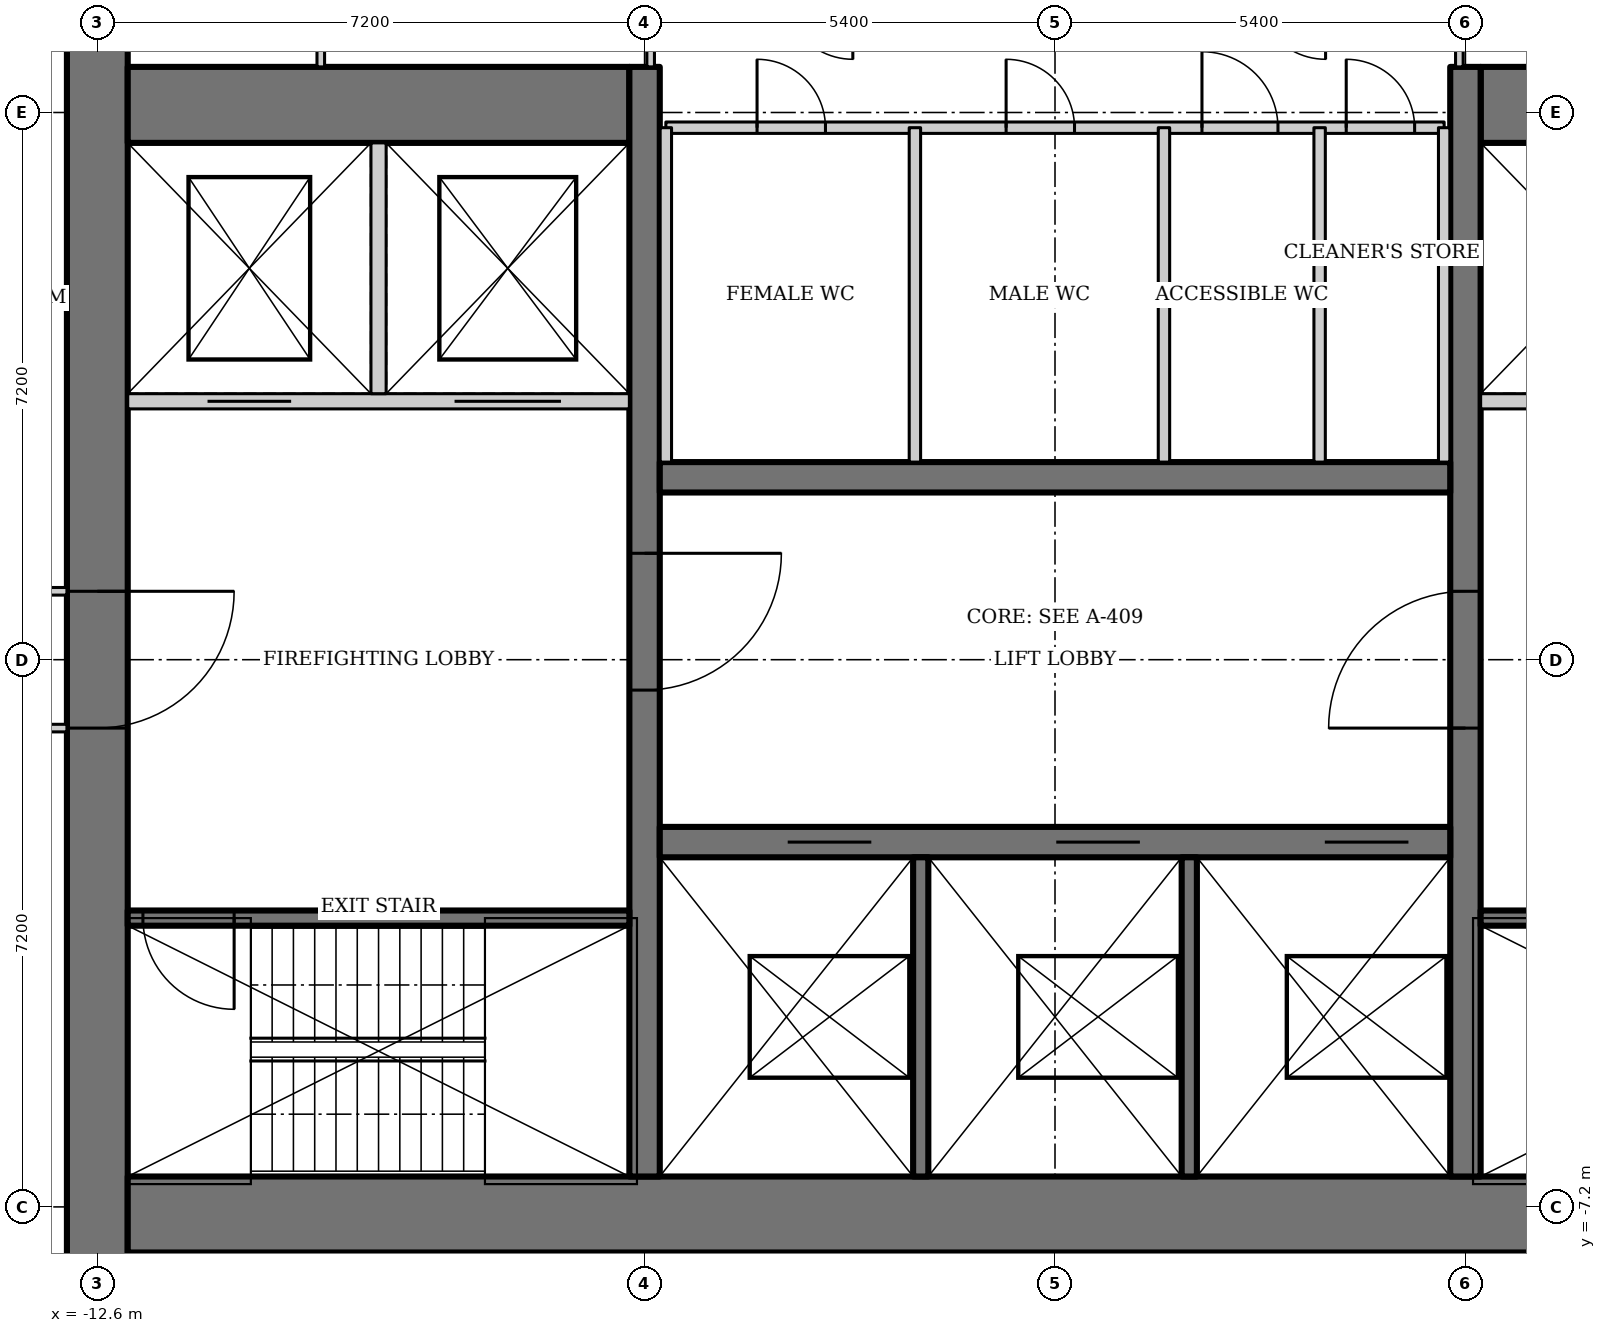
"""IFC4 building model, lengths in metres.
Left out: names, types, materials, properties, quantities, classifications, styles, units other than length and angle.
Written with IfcOpenShell. Run it as: python <this file> out.ifc"""

import sys

from ifc_helpers import new_model, si_unit, direction, frame, frame_2d, origin, place, context, subcontext, project, spatial, rectangle, extrude, element, fill, save


model = new_model("IFC4")
c1 = context("Model", 3, precision=1e-05, world=origin(), true_north=direction((0.0, 1.0)))
c2 = subcontext(c1, "Body", "Model", "MODEL_VIEW")
j1 = project(units=[si_unit("LENGTHUNIT", "METRE"), si_unit("PLANEANGLEUNIT", "RADIAN")], contexts=[c1])
p1 = place(None, origin())
s1 = spatial("IfcSite", under=j1, at=p1, CompositionType="ELEMENT")
p2 = place(p1, origin())
s2 = spatial("IfcBuilding", under=s1, at=p2, CompositionType="ELEMENT")
p3 = place(p2, frame((0.0, 0.0, 236.8)))
s3 = spatial("IfcBuildingStorey", under=s2, at=p3, CompositionType="ELEMENT", Elevation=236.8)
p4 = place(p3, frame((-12.6, 13.0, 0.0), z_axis=(0.0, 0.0, 1.0), x_axis=(0.0, -1.0, 0.0)))
e1 = element("IfcWall", 1, at=p4, inside=s3, PredefinedType="SHEAR", context=c2, shape_type="SweptSolid", body=[
    extrude(rectangle(XDim=26.0, YDim=0.8, at=frame_2d((13.0, 0.0))), origin(), (0.0, 0.0, 1.0), 4.2),
])
p5 = place(p4, frame((12.1, 0.0, 0.0)))
e2 = element("IfcOpeningElement", 2, at=p5, cuts=e1, PredefinedType="OPENING", context=c2, shape_type="SweptSolid", body=[
    extrude(rectangle(XDim=1.8, YDim=2.1, at=frame_2d((0.9, 1.05))), frame((0.0, 0.41, 0.0), z_axis=(0.0, -1.0, 0.0), x_axis=(1.0, 0.0, 0.0)), (0.0, 0.0, 1.0), 0.82),
])
p6 = place(p3, frame((-12.2, -7.3, 0.0), z_axis=(0.0, 0.0, 1.0), x_axis=(1.0, 0.0, 0.0)))
e3 = element("IfcWall", 3, at=p6, inside=s3, PredefinedType="SHEAR", context=c2, shape_type="SweptSolid", body=[
    extrude(rectangle(XDim=24.4, YDim=1.0, at=frame_2d((12.2, 0.0))), origin(), (0.0, 0.0, 1.0), 4.2),
])
for number, where, z_axis, x_axis in (
    (4, (12.2, 7.3, 0.0), (0.0, 0.0, 1.0), (-1.0, 0.0, 0.0)),
    (5, (-5.6, 7.3, 0.0), (0.0, 0.0, 1.0), (-1.0, 0.0, 0.0)),
):
    element("IfcWall", number, at=place(p3, frame(where, z_axis=z_axis, x_axis=x_axis)), inside=s3, PredefinedType="SHEAR", context=c2, shape_type="SweptSolid", body=[
        extrude(rectangle(XDim=6.6, YDim=1.0, at=frame_2d((3.3, 0.0))), origin(), (0.0, 0.0, 1.0), 4.2),
    ])
p7 = place(p3, frame((5.4, -6.8, 0.0), z_axis=(0.0, 0.0, 1.0), x_axis=(0.0, 1.0, 0.0)))
e6 = element("IfcWall", 6, at=p7, inside=s3, PredefinedType="SHEAR", context=c2, shape_type="SweptSolid", body=[
    extrude(rectangle(XDim=14.6, YDim=0.4, at=frame_2d((7.3, 0.0))), origin(), (0.0, 0.0, 1.0), 4.2),
])
p8 = place(p7, frame((5.9, 0.0, 0.0)))
e7 = element("IfcOpeningElement", 7, at=p8, cuts=e6, PredefinedType="OPENING", context=c2, shape_type="SweptSolid", body=[
    extrude(rectangle(XDim=1.8, YDim=2.1, at=frame_2d((0.9, 1.05))), frame((0.0, 0.21, 0.0), z_axis=(0.0, -1.0, 0.0), x_axis=(1.0, 0.0, 0.0)), (0.0, 0.0, 1.0), 0.42),
])
p9 = place(p3, frame((-5.4, 7.8, 0.0), z_axis=(0.0, 0.0, 1.0), x_axis=(0.0, -1.0, 0.0)))
e8 = element("IfcWall", 8, at=p9, inside=s3, PredefinedType="SHEAR", context=c2, shape_type="SweptSolid", body=[
    extrude(rectangle(XDim=14.6, YDim=0.4, at=frame_2d((7.3, 0.0))), origin(), (0.0, 0.0, 1.0), 4.2),
])
p10 = place(p9, frame((6.4, 0.0, 0.0)))
e9 = element("IfcOpeningElement", 9, at=p10, cuts=e8, PredefinedType="OPENING", context=c2, shape_type="SweptSolid", body=[
    extrude(rectangle(XDim=1.8, YDim=2.1, at=frame_2d((0.9, 1.05))), frame((0.0, 0.21, 0.0), z_axis=(0.0, -1.0, 0.0), x_axis=(1.0, 0.0, 0.0)), (0.0, 0.0, 1.0), 0.42),
])
p11 = place(p3, frame((-5.2, -2.4, 0.0), z_axis=(0.0, 0.0, 1.0), x_axis=(1.0, 0.0, 0.0)))
e10 = element("IfcWall", 10, at=p11, inside=s3, PredefinedType="SHEAR", context=c2, shape_type="SweptSolid", body=[
    extrude(rectangle(XDim=10.4, YDim=0.4, at=frame_2d((5.2, 0.0))), origin(), (0.0, 0.0, 1.0), 4.2),
])
p12 = place(p11, frame((1.683, 0.0, 0.0)))
e11 = element("IfcOpeningElement", 11, at=p12, cuts=e10, PredefinedType="OPENING", context=c2, shape_type="SweptSolid", body=[
    extrude(rectangle(XDim=1.1, YDim=2.2, at=frame_2d((0.55, 1.1))), frame((0.0, 0.21, 0.0), z_axis=(0.0, -1.0, 0.0), x_axis=(1.0, 0.0, 0.0)), (0.0, 0.0, 1.0), 0.42),
])
p13 = place(p11, frame((5.217, 0.0, 0.0)))
e12 = element("IfcOpeningElement", 12, at=p13, cuts=e10, PredefinedType="OPENING", context=c2, shape_type="SweptSolid", body=[
    extrude(rectangle(XDim=1.1, YDim=2.2, at=frame_2d((0.55, 1.1))), frame((0.0, 0.21, 0.0), z_axis=(0.0, -1.0, 0.0), x_axis=(1.0, 0.0, 0.0)), (0.0, 0.0, 1.0), 0.42),
])
p14 = place(p11, frame((8.75, 0.0, 0.0)))
e13 = element("IfcOpeningElement", 13, at=p14, cuts=e10, PredefinedType="OPENING", context=c2, shape_type="SweptSolid", body=[
    extrude(rectangle(XDim=1.1, YDim=2.2, at=frame_2d((0.55, 1.1))), frame((0.0, 0.21, 0.0), z_axis=(0.0, -1.0, 0.0), x_axis=(1.0, 0.0, 0.0)), (0.0, 0.0, 1.0), 0.42),
])
for number, where, z_axis, x_axis in (
    (14, (-1.767, -2.6, 0.0), (0.0, 0.0, 1.0), (0.0, -1.0, 0.0)),
    (15, (1.767, -2.6, 0.0), (0.0, 0.0, 1.0), (0.0, -1.0, 0.0)),
):
    element("IfcWall", number, at=place(p3, frame(where, z_axis=z_axis, x_axis=x_axis)), inside=s3, PredefinedType="SOLIDWALL", context=c2, shape_type="SweptSolid", body=[
        extrude(rectangle(XDim=4.2, YDim=0.2, at=frame_2d((2.1, 0.0))), origin(), (0.0, 0.0, 1.0), 4.2),
    ])
p15 = place(p3, frame((5.2, 2.4, 0.0), z_axis=(0.0, 0.0, 1.0), x_axis=(-1.0, 0.0, 0.0)))
e16 = element("IfcWall", 16, at=p15, inside=s3, PredefinedType="SHEAR", context=c2, shape_type="SweptSolid", body=[
    extrude(rectangle(XDim=10.4, YDim=0.4, at=frame_2d((5.2, 0.0))), origin(), (0.0, 0.0, 1.0), 4.2),
])
p16 = place(p3, frame((5.6, -3.4, 0.0), z_axis=(0.0, 0.0, 1.0), x_axis=(1.0, 0.0, 0.0)))
e17 = element("IfcWall", 17, at=p16, inside=s3, PredefinedType="SHEAR", context=c2, shape_type="SweptSolid", body=[
    extrude(rectangle(XDim=6.6, YDim=0.2, at=frame_2d((3.3, 0.0))), origin(), (0.0, 0.0, 1.0), 4.2),
])
p17 = place(p16, frame((5.2, 0.0, 0.0)))
e18 = element("IfcOpeningElement", 18, at=p17, cuts=e17, PredefinedType="OPENING", context=c2, shape_type="SweptSolid", body=[
    extrude(rectangle(XDim=1.2, YDim=2.1, at=frame_2d((0.6, 1.05))), frame((0.0, 0.11, 0.0), z_axis=(0.0, -1.0, 0.0), x_axis=(1.0, 0.0, 0.0)), (0.0, 0.0, 1.0), 0.22),
])
p18 = place(p3, frame((12.2, 3.4, 0.0), z_axis=(0.0, 0.0, 1.0), x_axis=(-1.0, 0.0, 0.0)))
e19 = element("IfcWall", 19, at=p18, inside=s3, PredefinedType="SOLIDWALL", context=c2, shape_type="SweptSolid", body=[
    extrude(rectangle(XDim=6.6, YDim=0.2, at=frame_2d((3.3, 0.0))), origin(), (0.0, 0.0, 1.0), 4.2),
])
p19 = place(p18, frame((4.45, 0.0, 0.0)))
e20 = element("IfcOpeningElement", 20, at=p19, cuts=e19, PredefinedType="OPENING", context=c2, shape_type="SweptSolid", body=[
    extrude(rectangle(XDim=1.1, YDim=2.2, at=frame_2d((0.55, 1.1))), frame((0.0, 0.11, 0.0), z_axis=(0.0, -1.0, 0.0), x_axis=(1.0, 0.0, 0.0)), (0.0, 0.0, 1.0), 0.22),
])
p20 = place(p18, frame((0.9, 0.0, 0.0)))
e21 = element("IfcOpeningElement", 21, at=p20, cuts=e19, PredefinedType="OPENING", context=c2, shape_type="SweptSolid", body=[
    extrude(rectangle(XDim=1.4, YDim=2.2, at=frame_2d((0.7, 1.1))), frame((0.0, 0.11, 0.0), z_axis=(0.0, -1.0, 0.0), x_axis=(1.0, 0.0, 0.0)), (0.0, 0.0, 1.0), 0.22),
])
p21 = place(p3, frame((-5.6, -3.4, 0.0), z_axis=(0.0, 0.0, 1.0), x_axis=(-1.0, 0.0, 0.0)))
e22 = element("IfcWall", 22, at=p21, inside=s3, PredefinedType="SHEAR", context=c2, shape_type="SweptSolid", body=[
    extrude(rectangle(XDim=6.6, YDim=0.2, at=frame_2d((3.3, 0.0))), origin(), (0.0, 0.0, 1.0), 4.2),
])
p22 = place(p21, frame((5.2, 0.0, 0.0)))
e23 = element("IfcOpeningElement", 23, at=p22, cuts=e22, PredefinedType="OPENING", context=c2, shape_type="SweptSolid", body=[
    extrude(rectangle(XDim=1.2, YDim=2.1, at=frame_2d((0.6, 1.05))), frame((0.0, 0.11, 0.0), z_axis=(0.0, -1.0, 0.0), x_axis=(1.0, 0.0, 0.0)), (0.0, 0.0, 1.0), 0.22),
])
p23 = place(p3, frame((-12.2, 3.4, 0.0), z_axis=(0.0, 0.0, 1.0), x_axis=(1.0, 0.0, 0.0)))
e24 = element("IfcWall", 24, at=p23, inside=s3, PredefinedType="SOLIDWALL", context=c2, shape_type="SweptSolid", body=[
    extrude(rectangle(XDim=6.6, YDim=0.2, at=frame_2d((3.3, 0.0))), origin(), (0.0, 0.0, 1.0), 4.2),
])
p24 = place(p23, frame((1.05, 0.0, 0.0)))
e25 = element("IfcOpeningElement", 25, at=p24, cuts=e24, PredefinedType="OPENING", context=c2, shape_type="SweptSolid", body=[
    extrude(rectangle(XDim=1.1, YDim=2.2, at=frame_2d((0.55, 1.1))), frame((0.0, 0.11, 0.0), z_axis=(0.0, -1.0, 0.0), x_axis=(1.0, 0.0, 0.0)), (0.0, 0.0, 1.0), 0.22),
])
p25 = place(p23, frame((4.3, 0.0, 0.0)))
e26 = element("IfcOpeningElement", 26, at=p25, cuts=e24, PredefinedType="OPENING", context=c2, shape_type="SweptSolid", body=[
    extrude(rectangle(XDim=1.4, YDim=2.2, at=frame_2d((0.7, 1.1))), frame((0.0, 0.11, 0.0), z_axis=(0.0, -1.0, 0.0), x_axis=(1.0, 0.0, 0.0)), (0.0, 0.0, 1.0), 0.22),
])
p26 = place(p3, frame((-8.9, 3.5, 0.0), z_axis=(0.0, 0.0, 1.0), x_axis=(0.0, 1.0, 0.0)))
e27 = element("IfcWall", 27, at=p26, inside=s3, PredefinedType="SOLIDWALL", context=c2, shape_type="SweptSolid", body=[
    extrude(rectangle(XDim=3.3, YDim=0.2, at=frame_2d((1.65, 0.0))), origin(), (0.0, 0.0, 1.0), 4.2),
])
p27 = place(p3, frame((-5.12, 7.0, 0.0), z_axis=(0.0, 0.0, 1.0), x_axis=(1.0, 0.0, 0.0)))
e28 = element("IfcWall", 28, at=p27, inside=s3, PredefinedType="SOLIDWALL", context=c2, shape_type="SweptSolid", body=[
    extrude(rectangle(XDim=10.24, YDim=0.15, at=frame_2d((5.12, 0.0))), origin(), (0.0, 0.0, 1.0), 4.05),
])
p28 = place(p27, frame((1.2, 0.0, 0.0)))
e29 = element("IfcOpeningElement", 29, at=p28, cuts=e28, PredefinedType="OPENING", context=c2, shape_type="SweptSolid", body=[
    extrude(rectangle(XDim=0.9, YDim=2.1, at=frame_2d((0.45, 1.05))), frame((0.0, 0.085, 0.0), z_axis=(0.0, -1.0, 0.0), x_axis=(1.0, 0.0, 0.0)), (0.0, 0.0, 1.0), 0.17),
])
p29 = place(p27, frame((4.477, 0.0, 0.0)))
e30 = element("IfcOpeningElement", 30, at=p29, cuts=e28, PredefinedType="OPENING", context=c2, shape_type="SweptSolid", body=[
    extrude(rectangle(XDim=0.9, YDim=2.1, at=frame_2d((0.45, 1.05))), frame((0.0, 0.085, 0.0), z_axis=(0.0, -1.0, 0.0), x_axis=(1.0, 0.0, 0.0)), (0.0, 0.0, 1.0), 0.17),
])
p30 = place(p27, frame((7.054, 0.0, 0.0)))
e31 = element("IfcOpeningElement", 31, at=p30, cuts=e28, PredefinedType="OPENING", context=c2, shape_type="SweptSolid", body=[
    extrude(rectangle(XDim=1.0, YDim=2.1, at=frame_2d((0.5, 1.05))), frame((0.0, 0.085, 0.0), z_axis=(0.0, -1.0, 0.0), x_axis=(1.0, 0.0, 0.0)), (0.0, 0.0, 1.0), 0.17),
])
p31 = place(p27, frame((8.952, 0.0, 0.0)))
e32 = element("IfcOpeningElement", 32, at=p31, cuts=e28, PredefinedType="OPENING", context=c2, shape_type="SweptSolid", body=[
    extrude(rectangle(XDim=0.9, YDim=2.1, at=frame_2d((0.45, 1.05))), frame((0.0, 0.085, 0.0), z_axis=(0.0, -1.0, 0.0), x_axis=(1.0, 0.0, 0.0)), (0.0, 0.0, 1.0), 0.17),
])
for number, where, z_axis, x_axis in (
    (33, (-5.12, 2.6, 0.0), (0.0, 0.0, 1.0), (0.0, 1.0, 0.0)),
    (34, (5.12, 2.6, 0.0), (0.0, 0.0, 1.0), (0.0, 1.0, 0.0)),
    (35, (-1.843, 2.6, 0.0), (0.0, 0.0, 1.0), (0.0, 1.0, 0.0)),
):
    element("IfcWall", number, at=place(p3, frame(where, z_axis=z_axis, x_axis=x_axis)), inside=s3, PredefinedType="SOLIDWALL", context=c2, shape_type="SweptSolid", body=[
        extrude(rectangle(XDim=4.4, YDim=0.15, at=frame_2d((2.2, 0.0))), origin(), (0.0, 0.0, 1.0), 4.05),
    ])
p32 = place(p3, frame((1.434, 2.6, 0.0), z_axis=(0.0, 0.0, 1.0), x_axis=(0.0, 1.0, 0.0)))
e36 = element("IfcWall", 36, at=p32, inside=s3, PredefinedType="SOLIDWALL", context=c2, shape_type="SweptSolid", body=[
    extrude(rectangle(XDim=4.4, YDim=0.15, at=frame_2d((2.2, 0.0))), origin(), (0.0, 0.0, 1.0), 3.108),
])
p33 = place(p3, frame((3.482, 2.6, 0.0), z_axis=(0.0, 0.0, 1.0), x_axis=(0.0, 1.0, 0.0)))
e37 = element("IfcWall", 37, at=p33, inside=s3, PredefinedType="SOLIDWALL", context=c2, shape_type="SweptSolid", body=[
    extrude(rectangle(XDim=4.4, YDim=0.15, at=frame_2d((2.2, 0.0))), origin(), (0.0, 0.0, 1.0), 4.05),
])
p34 = place(p3, frame((5.32, 7.8, 0.0), z_axis=(0.0, 0.0, 1.0), x_axis=(0.0, 1.0, 0.0)))
e38 = element("IfcWall", 38, at=p34, inside=s3, PredefinedType="PARTITIONING", context=c2, shape_type="SweptSolid", body=[
    extrude(rectangle(XDim=1.0, YDim=0.1, at=frame_2d((0.5, 0.0))), origin(), (0.0, 0.0, 1.0), 4.05),
])
p35 = place(p3, frame((-9.66, 10.017, 0.0), z_axis=(0.0, 0.0, 1.0), x_axis=(0.0, -1.0, 0.0)))
e39 = element("IfcWall", 39, at=p35, inside=s3, PredefinedType="PARTITIONING", context=c2, shape_type="SweptSolid", body=[
    extrude(rectangle(XDim=2.217, YDim=0.1, at=frame_2d((1.108, 0.0))), origin(), (0.0, 0.0, 1.0), 4.05),
])
p36 = place(p3, frame((-5.32, 8.8, 0.0), z_axis=(0.0, 0.0, 1.0), x_axis=(0.0, -1.0, 0.0)))
e40 = element("IfcWall", 40, at=p36, inside=s3, PredefinedType="PARTITIONING", context=c2, shape_type="SweptSolid", body=[
    extrude(rectangle(XDim=1.0, YDim=0.1, at=frame_2d((0.5, 0.0))), origin(), (0.0, 0.0, 1.0), 4.05),
])
p37 = place(p3, frame((-15.165, -0.9, 0.0), z_axis=(0.0, 0.0, 1.0), x_axis=(1.0, 0.0, 0.0)))
e41 = element("IfcWall", 41, at=p37, inside=s3, PredefinedType="PARTITIONING", context=c2, shape_type="SweptSolid", body=[
    extrude(rectangle(XDim=2.165, YDim=0.1, at=frame_2d((1.083, 0.0))), origin(), (0.0, 0.0, 1.0), 4.05),
])
p38 = place(p37, frame((0.1, 0.0, 0.0)))
e42 = element("IfcOpeningElement", 42, at=p38, cuts=e41, PredefinedType="OPENING", context=c2, shape_type="SweptSolid", body=[
    extrude(rectangle(XDim=0.9, YDim=2.1, at=frame_2d((0.45, 1.05))), frame((0.0, 0.06, 0.0), z_axis=(0.0, -1.0, 0.0), x_axis=(1.0, 0.0, 0.0)), (0.0, 0.0, 1.0), 0.12),
])
p39 = place(p3, frame((-13.0, 0.9, 0.0), z_axis=(0.0, 0.0, 1.0), x_axis=(-1.0, 0.0, 0.0)))
e43 = element("IfcWall", 43, at=p39, inside=s3, PredefinedType="PARTITIONING", context=c2, shape_type="SweptSolid", body=[
    extrude(rectangle(XDim=2.165, YDim=0.1, at=frame_2d((1.083, 0.0))), origin(), (0.0, 0.0, 1.0), 4.05),
])
p40 = place(p39, frame((1.15, 0.0, 0.0)))
e44 = element("IfcOpeningElement", 44, at=p40, cuts=e43, PredefinedType="OPENING", context=c2, shape_type="SweptSolid", body=[
    extrude(rectangle(XDim=0.9, YDim=2.1, at=frame_2d((0.45, 1.05))), frame((0.0, 0.06, 0.0), z_axis=(0.0, -1.0, 0.0), x_axis=(1.0, 0.0, 0.0)), (0.0, 0.0, 1.0), 0.12),
])
p41 = place(p8, origin())
e45 = element("IfcDoor", 45, at=p41, inside=s3, OperationType="DOUBLE_DOOR_DOUBLE_SWING", PredefinedType="DOOR", context=c2, shape_type="SweptSolid", body=[
    extrude(rectangle(XDim=1.8, YDim=2.1, at=frame_2d((0.9, 1.05))), frame((0.0, 0.025, 0.0), z_axis=(0.0, -1.0, 0.0), x_axis=(1.0, 0.0, 0.0)), (0.0, 0.0, 1.0), 0.05),
])
fill(e7, e45)
p42 = place(p10, origin())
e46 = element("IfcDoor", 46, at=p42, inside=s3, OperationType="DOUBLE_DOOR_DOUBLE_SWING", PredefinedType="DOOR", context=c2, shape_type="SweptSolid", body=[
    extrude(rectangle(XDim=1.8, YDim=2.1, at=frame_2d((0.9, 1.05))), frame((0.0, 0.025, 0.0), z_axis=(0.0, -1.0, 0.0), x_axis=(1.0, 0.0, 0.0)), (0.0, 0.0, 1.0), 0.05),
])
fill(e9, e46)
p43 = place(p22, origin())
e47 = element("IfcDoor", 47, at=p43, inside=s3, OperationType="SINGLE_SWING_RIGHT", PredefinedType="DOOR", context=c2, shape_type="SweptSolid", body=[
    extrude(rectangle(XDim=1.2, YDim=2.1, at=frame_2d((0.6, 1.05))), frame((0.0, 0.025, 0.0), z_axis=(0.0, -1.0, 0.0), x_axis=(1.0, 0.0, 0.0)), (0.0, 0.0, 1.0), 0.05),
])
fill(e23, e47)
p44 = place(p5, origin())
e48 = element("IfcDoor", 48, at=p44, inside=s3, OperationType="DOUBLE_DOOR_DOUBLE_SWING", PredefinedType="DOOR", context=c2, shape_type="SweptSolid", body=[
    extrude(rectangle(XDim=1.8, YDim=2.1, at=frame_2d((0.9, 1.05))), frame((0.0, 0.025, 0.0), z_axis=(0.0, -1.0, 0.0), x_axis=(1.0, 0.0, 0.0)), (0.0, 0.0, 1.0), 0.05),
])
fill(e2, e48)
p45 = place(p12, origin())
e49 = element("IfcDoor", 49, at=p45, inside=s3, OperationType="DOUBLE_DOOR_SLIDING", PredefinedType="DOOR", context=c2, shape_type="SweptSolid", body=[
    extrude(rectangle(XDim=1.1, YDim=2.2, at=frame_2d((0.55, 1.1))), frame((0.0, 0.025, 0.0), z_axis=(0.0, -1.0, 0.0), x_axis=(1.0, 0.0, 0.0)), (0.0, 0.0, 1.0), 0.05),
])
fill(e11, e49)
p46 = place(p13, origin())
e50 = element("IfcDoor", 50, at=p46, inside=s3, OperationType="DOUBLE_DOOR_SLIDING", PredefinedType="DOOR", context=c2, shape_type="SweptSolid", body=[
    extrude(rectangle(XDim=1.1, YDim=2.2, at=frame_2d((0.55, 1.1))), frame((0.0, 0.025, 0.0), z_axis=(0.0, -1.0, 0.0), x_axis=(1.0, 0.0, 0.0)), (0.0, 0.0, 1.0), 0.05),
])
fill(e12, e50)
p47 = place(p14, origin())
e51 = element("IfcDoor", 51, at=p47, inside=s3, OperationType="DOUBLE_DOOR_SLIDING", PredefinedType="DOOR", context=c2, shape_type="SweptSolid", body=[
    extrude(rectangle(XDim=1.1, YDim=2.2, at=frame_2d((0.55, 1.1))), frame((0.0, 0.025, 0.0), z_axis=(0.0, -1.0, 0.0), x_axis=(1.0, 0.0, 0.0)), (0.0, 0.0, 1.0), 0.05),
])
fill(e13, e51)
p48 = place(p24, origin())
e52 = element("IfcDoor", 52, at=p48, inside=s3, OperationType="DOUBLE_DOOR_SLIDING", PredefinedType="DOOR", context=c2, shape_type="SweptSolid", body=[
    extrude(rectangle(XDim=1.1, YDim=2.2, at=frame_2d((0.55, 1.1))), frame((0.0, 0.025, 0.0), z_axis=(0.0, -1.0, 0.0), x_axis=(1.0, 0.0, 0.0)), (0.0, 0.0, 1.0), 0.05),
])
fill(e25, e52)
p49 = place(p25, origin())
e53 = element("IfcDoor", 53, at=p49, inside=s3, OperationType="DOUBLE_DOOR_SLIDING", PredefinedType="DOOR", context=c2, shape_type="SweptSolid", body=[
    extrude(rectangle(XDim=1.4, YDim=2.2, at=frame_2d((0.7, 1.1))), frame((0.0, 0.025, 0.0), z_axis=(0.0, -1.0, 0.0), x_axis=(1.0, 0.0, 0.0)), (0.0, 0.0, 1.0), 0.05),
])
fill(e26, e53)
p50 = place(p28, origin())
e54 = element("IfcDoor", 54, at=p50, inside=s3, OperationType="SINGLE_SWING_LEFT", PredefinedType="DOOR", context=c2, shape_type="SweptSolid", body=[
    extrude(rectangle(XDim=0.9, YDim=2.1, at=frame_2d((0.45, 1.05))), frame((0.0, 0.025, 0.0), z_axis=(0.0, -1.0, 0.0), x_axis=(1.0, 0.0, 0.0)), (0.0, 0.0, 1.0), 0.05),
])
fill(e29, e54)
p51 = place(p29, origin())
e55 = element("IfcDoor", 55, at=p51, inside=s3, OperationType="SINGLE_SWING_LEFT", PredefinedType="DOOR", context=c2, shape_type="SweptSolid", body=[
    extrude(rectangle(XDim=0.9, YDim=2.1, at=frame_2d((0.45, 1.05))), frame((0.0, 0.025, 0.0), z_axis=(0.0, -1.0, 0.0), x_axis=(1.0, 0.0, 0.0)), (0.0, 0.0, 1.0), 0.05),
])
fill(e30, e55)
p52 = place(p30, origin())
e56 = element("IfcDoor", 56, at=p52, inside=s3, OperationType="SINGLE_SWING_LEFT", PredefinedType="DOOR", context=c2, shape_type="SweptSolid", body=[
    extrude(rectangle(XDim=1.0, YDim=2.1, at=frame_2d((0.5, 1.05))), frame((0.0, 0.025, 0.0), z_axis=(0.0, -1.0, 0.0), x_axis=(1.0, 0.0, 0.0)), (0.0, 0.0, 1.0), 0.05),
])
fill(e31, e56)
p53 = place(p31, origin())
e57 = element("IfcDoor", 57, at=p53, inside=s3, OperationType="SINGLE_SWING_LEFT", PredefinedType="DOOR", context=c2, shape_type="SweptSolid", body=[
    extrude(rectangle(XDim=0.9, YDim=2.1, at=frame_2d((0.45, 1.05))), frame((0.0, 0.025, 0.0), z_axis=(0.0, -1.0, 0.0), x_axis=(1.0, 0.0, 0.0)), (0.0, 0.0, 1.0), 0.05),
])
fill(e32, e57)
save(model, sys.argv[1])
